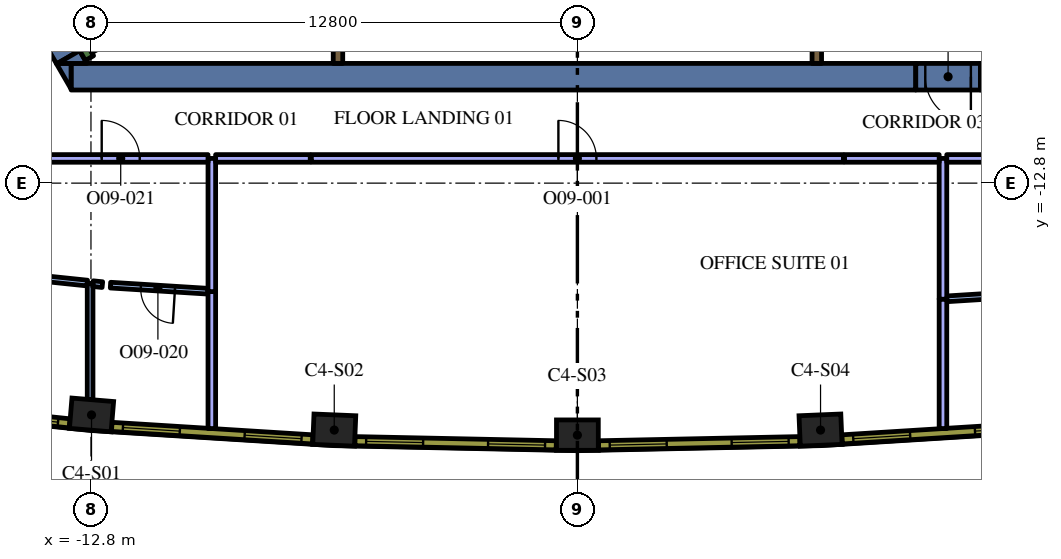
"""IFC4 building model, lengths in metres.
Left out: names, types, materials, properties, quantities, classifications, styles, units other than length and angle.
Written with IfcOpenShell. Run it as: python <this file> out.ifc"""

import sys

from ifc_helpers import new_model, si_unit, direction, frame, frame_2d, origin, origin_2d, place, context, subcontext, project, spatial, polyline, rectangle, outline, extrude, element, fill, save


model = new_model("IFC4")
c1 = context("Model", 3, precision=1e-05, world=origin(), true_north=direction((0.0, 1.0)))
c2 = subcontext(c1, "Body", "Model", "MODEL_VIEW")
j1 = project(units=[si_unit("LENGTHUNIT", "METRE"), si_unit("PLANEANGLEUNIT", "RADIAN")], contexts=[c1])
p1 = place(None, origin())
s1 = spatial("IfcSite", under=j1, at=p1, CompositionType="ELEMENT")
p2 = place(p1, origin())
s2 = spatial("IfcBuilding", under=s1, at=p2, CompositionType="ELEMENT")
p3 = place(p2, frame((0.0, 0.0, 243.6)))
s3 = spatial("IfcBuildingStorey", under=s2, at=p3, CompositionType="ELEMENT", Elevation=243.6)
for number, where, z_axis, x_axis in (
    (1, (-12.785, -18.9, 0.0), (0.0, 0.0, 1.0), (0.997, -0.083, 0.0)),
    (2, (-6.398, -19.298, 0.0), (0.0, 0.0, 1.0), (0.999, -0.041, 0.0)),
    (3, (0.0, -19.431, 0.0), (0.0, 0.0, 1.0), (1.0, 0.0, 0.0)),
    (4, (6.398, -19.298, 0.0), (0.0, 0.0, 1.0), (0.999, 0.041, 0.0)),
):
    element("IfcColumn", number, at=place(p3, frame(where, z_axis=z_axis, x_axis=x_axis)), inside=s3, PredefinedType="COLUMN", context=c2, shape_type="SweptSolid", body=[
        extrude(rectangle(XDim=1.1, YDim=0.8, at=origin_2d()), origin(), (0.0, 0.0, 1.0), 4.2),
    ])
p4 = place(p3, frame((10.604, -10.0, 0.0), z_axis=(0.0, 0.0, 1.0), x_axis=(1.0, 0.0, 0.0)))
e5 = element("IfcWall", 5, at=p4, inside=s3, PredefinedType="SOLIDWALL", context=c2, shape_type="SweptSolid", body=[
    extrude(rectangle(XDim=1.909, YDim=0.7, at=frame_2d((0.955, 0.0))), origin(), (0.0, 0.0, 1.0), 4.2),
])
p5 = place(p3, frame((8.904, -10.0, 0.0), z_axis=(0.0, 0.0, 1.0), x_axis=(-1.0, 0.0, 0.0)))
e6 = element("IfcWall", 6, at=p5, inside=s3, PredefinedType="SOLIDWALL", context=c2, shape_type="SweptSolid", body=[
    extrude(rectangle(XDim=22.226, YDim=0.7, at=frame_2d((11.113, 0.0))), origin(), (0.0, 0.0, 1.0), 4.2),
])
p6 = place(p3, origin())
e7 = element("IfcWall", 7, at=p6, inside=s3, PredefinedType="SOLIDWALL", context=c2, shape_type="SweptSolid", body=[
    extrude(outline(polyline([(-13.712, -9.65), (-13.324, -9.65), (-13.324, -10.322), (-13.712, -9.65)])), origin(), (0.0, 0.0, 1.0), 4.2),
])
p7 = place(p3, frame((-13.402, -9.487, 0.0), z_axis=(0.0, 0.0, 1.0), x_axis=(-0.500020498207, 0.866013568815, 0.0)))
e8 = element("IfcWall", 8, at=p7, inside=s3, PredefinedType="SOLIDWALL", context=c2, shape_type="SweptSolid", body=[
    extrude(rectangle(XDim=3.829, YDim=0.7, at=frame_2d((1.915, 0.0))), origin(), (0.0, 0.0, 1.0), 4.2),
])
e9 = element("IfcWall", 9, at=p6, inside=s3, PredefinedType="SOLIDWALL", context=c2, shape_type="SweptSolid", body=[
    extrude(outline(polyline([(-12.904, -9.65), (-13.68, -9.65), (-13.098, -9.314), (-12.904, -9.65)])), origin(), (0.0, 0.0, 1.0), 4.2),
])
p8 = place(p3, frame((12.84, -9.261, 0.0), z_axis=(0.0, 0.0, 1.0), x_axis=(-0.866013990052, 0.500019768644, 0.0)))
e10 = element("IfcWall", 10, at=p8, inside=s3, PredefinedType="SOLIDWALL", context=c2, shape_type="SweptSolid", body=[
    extrude(rectangle(XDim=6.8, YDim=0.25, at=frame_2d((3.4, 0.0))), origin(), (0.0, 0.0, 1.0), 4.2),
])
p9 = place(p3, frame((-12.84, -9.511, 0.0), z_axis=(0.0, 0.0, 1.0), x_axis=(-0.499997733992, 0.866026712061, 0.0)))
e11 = element("IfcWall", 11, at=p9, inside=s3, PredefinedType="SOLIDWALL", context=c2, shape_type="SweptSolid", body=[
    extrude(rectangle(XDim=3.634, YDim=0.25, at=frame_2d((1.817, 0.0))), origin(), (0.0, 0.0, 1.0), 4.2),
])
p10 = place(p3, frame((-12.84, -9.261, 0.0), z_axis=(0.0, 0.0, 1.0), x_axis=(0.866016039709, 0.500016218704, 0.0)))
e12 = element("IfcWall", 12, at=p10, inside=s3, PredefinedType="SOLIDWALL", context=c2, shape_type="SweptSolid", body=[
    extrude(rectangle(XDim=7.05, YDim=0.25, at=frame_2d((3.525, 0.0))), origin(), (0.0, 0.0, 1.0), 4.2),
])
p11 = place(p3, frame((-6.3, -8.925, 0.0), z_axis=(0.0, 0.0, 1.0), x_axis=(0.0, -1.0, 0.0)))
e13 = element("IfcWall", 13, at=p11, inside=s3, PredefinedType="SOLIDWALL", context=c2, shape_type="SweptSolid", body=[
    extrude(rectangle(XDim=0.725, YDim=0.25, at=frame_2d((0.363, 0.0))), origin(), (0.0, 0.0, 1.0), 4.2),
])
p12 = place(p3, frame((6.3, -9.65, 0.0), z_axis=(0.0, 0.0, 1.0), x_axis=(0.0, 1.0, 0.0)))
e14 = element("IfcWall", 14, at=p12, inside=s3, PredefinedType="SOLIDWALL", context=c2, shape_type="SweptSolid", body=[
    extrude(rectangle(XDim=1.008, YDim=0.25, at=frame_2d((0.504, 0.0))), origin(), (0.0, 0.0, 1.0), 4.2),
])
p13 = place(p3, frame((10.604, -10.0, 0.0), z_axis=(0.0, 0.0, 1.0), x_axis=(-1.0, 0.0, 0.0)))
e15 = element("IfcWall", 15, at=p13, inside=s3, PredefinedType="SOLIDWALL", context=c2, shape_type="SweptSolid", body=[
    extrude(rectangle(XDim=1.7, YDim=0.7, at=frame_2d((0.85, 0.0))), origin(), (0.0, 0.0, 1.0), 4.2),
])
p14 = place(p13, frame((0.25, 0.0, 0.0)))
e16 = element("IfcOpeningElement", 16, at=p14, cuts=e15, PredefinedType="OPENING", context=c2, shape_type="SweptSolid", body=[
    extrude(rectangle(XDim=1.2, YDim=2.1, at=frame_2d((0.6, 1.05))), frame((0.0, 0.36, 0.0), z_axis=(0.0, -1.0, 0.0), x_axis=(1.0, 0.0, 0.0)), (0.0, 0.0, 1.0), 0.72),
])
p15 = place(p3, frame((9.62, -15.847, 0.0), z_axis=(0.0, 0.0, 1.0), x_axis=(0.0, -1.0, 0.0)))
e17 = element("IfcWall", 17, at=p15, inside=s3, PredefinedType="PARTITIONING", context=c2, shape_type="SweptSolid", body=[
    extrude(rectangle(XDim=3.411, YDim=0.2, at=frame_2d((1.705, 0.0))), origin(), (0.0, 0.0, 1.0), 3.45),
])
p16 = place(p3, frame((9.62, -12.15, 0.0), z_axis=(0.0, 0.0, 1.0), x_axis=(0.0, -1.0, 0.0)))
e18 = element("IfcWall", 18, at=p16, inside=s3, PredefinedType="PARTITIONING", context=c2, shape_type="SweptSolid", body=[
    extrude(rectangle(XDim=3.705, YDim=0.2, at=frame_2d((1.853, 0.0))), origin(), (0.0, 0.0, 1.0), 3.45),
])
p17 = place(p3, frame((-9.62, -19.257, 0.0), z_axis=(0.0, 0.0, 1.0), x_axis=(0.0, 1.0, 0.0)))
e19 = element("IfcWall", 19, at=p17, inside=s3, PredefinedType="PARTITIONING", context=c2, shape_type="SweptSolid", body=[
    extrude(rectangle(XDim=3.611, YDim=0.2, at=frame_2d((1.806, 0.0))), origin(), (0.0, 0.0, 1.0), 3.45),
])
p18 = place(p3, frame((-9.62, -15.654, 0.0), z_axis=(0.0, 0.0, 1.0), x_axis=(0.0, 1.0, 0.0)))
e20 = element("IfcWall", 20, at=p18, inside=s3, PredefinedType="PARTITIONING", context=c2, shape_type="SweptSolid", body=[
    extrude(rectangle(XDim=3.504, YDim=0.2, at=frame_2d((1.752, 0.0))), origin(), (0.0, 0.0, 1.0), 3.45),
])
p19 = place(p3, frame((-7.0, -12.15, 0.0), z_axis=(0.0, 0.0, 1.0), x_axis=(1.0, 0.0, 0.0)))
e21 = element("IfcWall", 21, at=p19, inside=s3, PredefinedType="PARTITIONING", context=c2, shape_type="SweptSolid", body=[
    extrude(rectangle(XDim=14.0, YDim=0.2, at=frame_2d((7.0, 0.0))), origin(), (0.0, 0.0, 1.0), 3.45),
])
p20 = place(p19, frame((6.5, 0.0, 0.0)))
e22 = element("IfcOpeningElement", 22, at=p20, cuts=e21, PredefinedType="OPENING", context=c2, shape_type="SweptSolid", body=[
    extrude(rectangle(XDim=1.0, YDim=2.1, at=frame_2d((0.5, 1.05))), frame((0.0, 0.11, 0.0), z_axis=(0.0, -1.0, 0.0), x_axis=(1.0, 0.0, 0.0)), (0.0, 0.0, 1.0), 0.22),
])
for number, where, z_axis, x_axis in (
    (23, (-9.52, -12.15, 0.0), (0.0, 0.0, 1.0), (1.0, 0.0, 0.0)),
    (24, (7.03, -12.15, 0.0), (0.0, 0.0, 1.0), (1.0, 0.0, 0.0)),
):
    element("IfcWall", number, at=place(p3, frame(where, z_axis=z_axis, x_axis=x_axis)), inside=s3, PredefinedType="PARTITIONING", context=c2, shape_type="SweptSolid", body=[
        extrude(rectangle(XDim=2.49, YDim=0.2, at=frame_2d((1.245, 0.0))), origin(), (0.0, 0.0, 1.0), 3.45),
    ])
p21 = place(p3, frame((9.72, -15.844, 0.0), z_axis=(0.0, 0.0, 1.0), x_axis=(0.998063411199, 0.062204720286, 0.0)))
e25 = element("IfcWall", 25, at=p21, inside=s3, PredefinedType="PARTITIONING", context=c2, shape_type="SweptSolid", body=[
    extrude(rectangle(XDim=2.802, YDim=0.15, at=frame_2d((1.401, 0.0))), origin(), (0.0, 0.0, 1.0), 3.45),
])
p22 = place(p3, frame((9.72, -12.15, 0.0), z_axis=(0.0, 0.0, 1.0), x_axis=(1.0, 0.0, 0.0)))
e26 = element("IfcWall", 26, at=p22, inside=s3, PredefinedType="PARTITIONING", context=c2, shape_type="SweptSolid", body=[
    extrude(rectangle(XDim=4.627, YDim=0.2, at=frame_2d((2.314, 0.0))), origin(), (0.0, 0.0, 1.0), 3.45),
])
p23 = place(p22, frame((1.8, 0.0, 0.0)))
e27 = element("IfcOpeningElement", 27, at=p23, cuts=e26, PredefinedType="OPENING", context=c2, shape_type="SweptSolid", body=[
    extrude(rectangle(XDim=1.0, YDim=2.1, at=frame_2d((0.5, 1.05))), frame((0.0, 0.11, 0.0), z_axis=(0.0, -1.0, 0.0), x_axis=(1.0, 0.0, 0.0)), (0.0, 0.0, 1.0), 0.22),
])
p24 = place(p3, frame((-12.823, -15.437, 0.0), z_axis=(0.0, 0.0, 1.0), x_axis=(0.0, -1.0, 0.0)))
e28 = element("IfcWall", 28, at=p24, inside=s3, PredefinedType="PARTITIONING", context=c2, shape_type="SweptSolid", body=[
    extrude(rectangle(XDim=3.058, YDim=0.15, at=frame_2d((1.529, 0.0))), origin(), (0.0, 0.0, 1.0), 3.45),
])
p25 = place(p3, frame((-12.898, -15.429, 0.0), z_axis=(0.0, 0.0, 1.0), x_axis=(-0.99462039429, 0.103587022653, 0.0)))
e29 = element("IfcWall", 29, at=p25, inside=s3, PredefinedType="PARTITIONING", context=c2, shape_type="SweptSolid", body=[
    extrude(rectangle(XDim=5.279, YDim=0.15, at=frame_2d((2.64, 0.0))), origin(), (0.0, 0.0, 1.0), 3.45),
])
p26 = place(p25, frame((2.179, 0.0, 0.0)))
e30 = element("IfcOpeningElement", 30, at=p26, cuts=e29, PredefinedType="OPENING", context=c2, shape_type="SweptSolid", body=[
    extrude(rectangle(XDim=0.9, YDim=2.1, at=frame_2d((0.45, 1.05))), frame((0.0, 0.085, 0.0), z_axis=(0.0, -1.0, 0.0), x_axis=(1.0, 0.0, 0.0)), (0.0, 0.0, 1.0), 0.17),
])
p27 = place(p3, frame((-12.748, -15.445, 0.0), z_axis=(0.0, 0.0, 1.0), x_axis=(0.99468140225, -0.102999553487, 0.0)))
e31 = element("IfcWall", 31, at=p27, inside=s3, PredefinedType="PARTITIONING", context=c2, shape_type="SweptSolid", body=[
    extrude(rectangle(XDim=0.249, YDim=0.15, at=frame_2d((0.125, 0.0))), origin(), (0.0, 0.0, 1.0), 3.45),
])
p28 = place(p3, frame((-9.72, -15.644, 0.0), z_axis=(0.0, 0.0, 1.0), x_axis=(-0.998064382534, 0.062189133425, 0.0)))
e32 = element("IfcWall", 32, at=p28, inside=s3, PredefinedType="PARTITIONING", context=c2, shape_type="SweptSolid", body=[
    extrude(rectangle(XDim=2.571, YDim=0.15, at=frame_2d((1.286, 0.0))), origin(), (0.0, 0.0, 1.0), 3.45),
])
p29 = place(p28, frame((0.871, 0.0, 0.0)))
e33 = element("IfcOpeningElement", 33, at=p29, cuts=e32, PredefinedType="OPENING", context=c2, shape_type="SweptSolid", body=[
    extrude(rectangle(XDim=0.9, YDim=2.1, at=frame_2d((0.45, 1.05))), frame((0.0, 0.085, 0.0), z_axis=(0.0, -1.0, 0.0), x_axis=(1.0, 0.0, 0.0)), (0.0, 0.0, 1.0), 0.17),
])
p30 = place(p3, frame((-14.317, -12.15, 0.0), z_axis=(0.0, 0.0, 1.0), x_axis=(1.0, 0.0, 0.0)))
e34 = element("IfcWall", 34, at=p30, inside=s3, PredefinedType="PARTITIONING", context=c2, shape_type="SweptSolid", body=[
    extrude(rectangle(XDim=4.597, YDim=0.2, at=frame_2d((2.299, 0.0))), origin(), (0.0, 0.0, 1.0), 3.45),
])
p31 = place(p30, frame((1.8, 0.0, 0.0)))
e35 = element("IfcOpeningElement", 35, at=p31, cuts=e34, PredefinedType="OPENING", context=c2, shape_type="SweptSolid", body=[
    extrude(rectangle(XDim=1.0, YDim=2.1, at=frame_2d((0.5, 1.05))), frame((0.0, 0.11, 0.0), z_axis=(0.0, -1.0, 0.0), x_axis=(1.0, 0.0, 0.0)), (0.0, 0.0, 1.0), 0.22),
])
p32 = place(p3, frame((-18.644, -18.571, 0.0), z_axis=(0.0, 0.0, 1.0), x_axis=(0.994621961215, -0.103571976272, 0.0)))
e36 = element("IfcWall", 36, at=p32, inside=s3, PredefinedType="SOLIDWALL", context=c2, shape_type="SweptSolid", body=[
    extrude(rectangle(XDim=5.311, YDim=0.24, at=frame_2d((2.655, 0.0))), origin(), (0.0, 0.0, 1.0), 3.95),
])
p33 = place(p32, frame((0.271, 0.0, 0.9)))
e37 = element("IfcOpeningElement", 37, at=p33, cuts=e36, PredefinedType="OPENING", context=c2, shape_type="SweptSolid", body=[
    extrude(rectangle(XDim=1.5, YDim=2.55, at=frame_2d((0.75, 1.275))), frame((0.0, 0.13, 0.0), z_axis=(0.0, -1.0, 0.0), x_axis=(1.0, 0.0, 0.0)), (0.0, 0.0, 1.0), 0.26),
])
p34 = place(p32, frame((3.504, 0.0, 0.9)))
e38 = element("IfcOpeningElement", 38, at=p34, cuts=e36, PredefinedType="OPENING", context=c2, shape_type="SweptSolid", body=[
    extrude(rectangle(XDim=1.5, YDim=2.55, at=frame_2d((0.75, 1.275))), frame((0.0, 0.13, 0.0), z_axis=(0.0, -1.0, 0.0), x_axis=(1.0, 0.0, 0.0)), (0.0, 0.0, 1.0), 0.26),
])
p35 = place(p3, frame((-12.253, -19.213, 0.0), z_axis=(0.0, 0.0, 1.0), x_axis=(0.9980633213, -0.062206162685, 0.0)))
e39 = element("IfcWall", 39, at=p35, inside=s3, PredefinedType="SOLIDWALL", context=c2, shape_type="SweptSolid", body=[
    extrude(rectangle(XDim=5.298, YDim=0.24, at=frame_2d((2.649, 0.0))), origin(), (0.0, 0.0, 1.0), 3.95),
])
p36 = place(p35, frame((0.294, 0.0, 0.9)))
e40 = element("IfcOpeningElement", 40, at=p36, cuts=e39, PredefinedType="OPENING", context=c2, shape_type="SweptSolid", body=[
    extrude(rectangle(XDim=1.5, YDim=2.55, at=frame_2d((0.75, 1.275))), frame((0.0, 0.13, 0.0), z_axis=(0.0, -1.0, 0.0), x_axis=(1.0, 0.0, 0.0)), (0.0, 0.0, 1.0), 0.26),
])
p37 = place(p35, frame((3.504, 0.0, 0.9)))
e41 = element("IfcOpeningElement", 41, at=p37, cuts=e39, PredefinedType="OPENING", context=c2, shape_type="SweptSolid", body=[
    extrude(rectangle(XDim=1.5, YDim=2.55, at=frame_2d((0.75, 1.275))), frame((0.0, 0.13, 0.0), z_axis=(0.0, -1.0, 0.0), x_axis=(1.0, 0.0, 0.0)), (0.0, 0.0, 1.0), 0.26),
])
p38 = place(p3, frame((-5.854, -19.589, 0.0), z_axis=(0.0, 0.0, 1.0), x_axis=(0.999784035184, -0.020781794712, 0.0)))
e42 = element("IfcWall", 42, at=p38, inside=s3, PredefinedType="SOLIDWALL", context=c2, shape_type="SweptSolid", body=[
    extrude(rectangle(XDim=5.298, YDim=0.24, at=frame_2d((2.649, 0.0))), origin(), (0.0, 0.0, 1.0), 3.95),
])
p39 = place(p38, frame((0.294, 0.0, 0.9)))
e43 = element("IfcOpeningElement", 43, at=p39, cuts=e42, PredefinedType="OPENING", context=c2, shape_type="SweptSolid", body=[
    extrude(rectangle(XDim=1.5, YDim=2.55, at=frame_2d((0.75, 1.275))), frame((0.0, 0.13, 0.0), z_axis=(0.0, -1.0, 0.0), x_axis=(1.0, 0.0, 0.0)), (0.0, 0.0, 1.0), 0.26),
])
p40 = place(p38, frame((3.504, 0.0, 0.9)))
e44 = element("IfcOpeningElement", 44, at=p40, cuts=e42, PredefinedType="OPENING", context=c2, shape_type="SweptSolid", body=[
    extrude(rectangle(XDim=1.5, YDim=2.55, at=frame_2d((0.75, 1.275))), frame((0.0, 0.13, 0.0), z_axis=(0.0, -1.0, 0.0), x_axis=(1.0, 0.0, 0.0)), (0.0, 0.0, 1.0), 0.26),
])
p41 = place(p3, frame((0.556, -19.699, 0.0), z_axis=(0.0, 0.0, 1.0), x_axis=(0.999784035184, 0.020781794712, 0.0)))
e45 = element("IfcWall", 45, at=p41, inside=s3, PredefinedType="SOLIDWALL", context=c2, shape_type="SweptSolid", body=[
    extrude(rectangle(XDim=5.298, YDim=0.24, at=frame_2d((2.649, 0.0))), origin(), (0.0, 0.0, 1.0), 3.95),
])
p42 = place(p41, frame((0.294, 0.0, 0.9)))
e46 = element("IfcOpeningElement", 46, at=p42, cuts=e45, PredefinedType="OPENING", context=c2, shape_type="SweptSolid", body=[
    extrude(rectangle(XDim=1.5, YDim=2.55, at=frame_2d((0.75, 1.275))), frame((0.0, 0.13, 0.0), z_axis=(0.0, -1.0, 0.0), x_axis=(1.0, 0.0, 0.0)), (0.0, 0.0, 1.0), 0.26),
])
p43 = place(p41, frame((3.504, 0.0, 0.9)))
e47 = element("IfcOpeningElement", 47, at=p43, cuts=e45, PredefinedType="OPENING", context=c2, shape_type="SweptSolid", body=[
    extrude(rectangle(XDim=1.5, YDim=2.55, at=frame_2d((0.75, 1.275))), frame((0.0, 0.13, 0.0), z_axis=(0.0, -1.0, 0.0), x_axis=(1.0, 0.0, 0.0)), (0.0, 0.0, 1.0), 0.26),
])
p44 = place(p3, frame((6.965, -19.543, 0.0), z_axis=(0.0, 0.0, 1.0), x_axis=(0.9980633213, 0.062206162685, 0.0)))
e48 = element("IfcWall", 48, at=p44, inside=s3, PredefinedType="SOLIDWALL", context=c2, shape_type="SweptSolid", body=[
    extrude(rectangle(XDim=5.298, YDim=0.24, at=frame_2d((2.649, 0.0))), origin(), (0.0, 0.0, 1.0), 3.95),
])
p45 = place(p44, frame((0.295, 0.0, 0.9)))
e49 = element("IfcOpeningElement", 49, at=p45, cuts=e48, PredefinedType="OPENING", context=c2, shape_type="SweptSolid", body=[
    extrude(rectangle(XDim=1.5, YDim=2.55, at=frame_2d((0.75, 1.275))), frame((0.0, 0.13, 0.0), z_axis=(0.0, -1.0, 0.0), x_axis=(1.0, 0.0, 0.0)), (0.0, 0.0, 1.0), 0.26),
])
p46 = place(p44, frame((3.504, 0.0, 0.9)))
e50 = element("IfcOpeningElement", 50, at=p46, cuts=e48, PredefinedType="OPENING", context=c2, shape_type="SweptSolid", body=[
    extrude(rectangle(XDim=1.5, YDim=2.55, at=frame_2d((0.75, 1.275))), frame((0.0, 0.13, 0.0), z_axis=(0.0, -1.0, 0.0), x_axis=(1.0, 0.0, 0.0)), (0.0, 0.0, 1.0), 0.26),
])
p47 = place(p14, origin())
e51 = element("IfcDoor", 51, at=p47, inside=s3, OperationType="SINGLE_SWING_LEFT", PredefinedType="DOOR", context=c2, shape_type="SweptSolid", body=[
    extrude(rectangle(XDim=1.2, YDim=2.1, at=frame_2d((0.6, 1.05))), frame((0.0, 0.025, 0.0), z_axis=(0.0, -1.0, 0.0), x_axis=(1.0, 0.0, 0.0)), (0.0, 0.0, 1.0), 0.05),
])
fill(e16, e51)
p48 = place(p20, origin())
e52 = element("IfcDoor", 52, at=p48, inside=s3, OperationType="SINGLE_SWING_RIGHT", PredefinedType="DOOR", context=c2, shape_type="SweptSolid", body=[
    extrude(rectangle(XDim=1.0, YDim=2.1, at=frame_2d((0.5, 1.05))), frame((0.0, 0.025, 0.0), z_axis=(0.0, -1.0, 0.0), x_axis=(1.0, 0.0, 0.0)), (0.0, 0.0, 1.0), 0.05),
])
fill(e22, e52)
p49 = place(p29, origin())
e53 = element("IfcDoor", 53, at=p49, inside=s3, OperationType="SINGLE_SWING_RIGHT", PredefinedType="DOOR", context=c2, shape_type="SweptSolid", body=[
    extrude(rectangle(XDim=0.9, YDim=2.1, at=frame_2d((0.45, 1.05))), frame((0.0, 0.025, 0.0), z_axis=(0.0, -1.0, 0.0), x_axis=(1.0, 0.0, 0.0)), (0.0, 0.0, 1.0), 0.05),
])
fill(e33, e53)
p50 = place(p31, origin())
e54 = element("IfcDoor", 54, at=p50, inside=s3, OperationType="SINGLE_SWING_RIGHT", PredefinedType="DOOR", context=c2, shape_type="SweptSolid", body=[
    extrude(rectangle(XDim=1.0, YDim=2.1, at=frame_2d((0.5, 1.05))), frame((0.0, 0.025, 0.0), z_axis=(0.0, -1.0, 0.0), x_axis=(1.0, 0.0, 0.0)), (0.0, 0.0, 1.0), 0.05),
])
fill(e35, e54)
p51 = place(p34, origin())
e55 = element("IfcWindow", 55, at=p51, inside=s3, PartitioningType="SINGLE_PANEL", PredefinedType="WINDOW", context=c2, shape_type="SweptSolid", body=[
    extrude(rectangle(XDim=1.5, YDim=2.55, at=frame_2d((0.75, 1.275))), frame((0.0, 0.04, 0.0), z_axis=(0.0, -1.0, 0.0), x_axis=(1.0, 0.0, 0.0)), (0.0, 0.0, 1.0), 0.06),
])
fill(e38, e55)
p52 = place(p36, origin())
e56 = element("IfcWindow", 56, at=p52, inside=s3, PartitioningType="SINGLE_PANEL", PredefinedType="WINDOW", context=c2, shape_type="SweptSolid", body=[
    extrude(rectangle(XDim=1.5, YDim=2.55, at=frame_2d((0.75, 1.275))), frame((0.0, 0.04, 0.0), z_axis=(0.0, -1.0, 0.0), x_axis=(1.0, 0.0, 0.0)), (0.0, 0.0, 1.0), 0.06),
])
fill(e40, e56)
p53 = place(p37, origin())
e57 = element("IfcWindow", 57, at=p53, inside=s3, PartitioningType="SINGLE_PANEL", PredefinedType="WINDOW", context=c2, shape_type="SweptSolid", body=[
    extrude(rectangle(XDim=1.5, YDim=2.55, at=frame_2d((0.75, 1.275))), frame((0.0, 0.04, 0.0), z_axis=(0.0, -1.0, 0.0), x_axis=(1.0, 0.0, 0.0)), (0.0, 0.0, 1.0), 0.06),
])
fill(e41, e57)
p54 = place(p39, origin())
e58 = element("IfcWindow", 58, at=p54, inside=s3, PartitioningType="SINGLE_PANEL", PredefinedType="WINDOW", context=c2, shape_type="SweptSolid", body=[
    extrude(rectangle(XDim=1.5, YDim=2.55, at=frame_2d((0.75, 1.275))), frame((0.0, 0.04, 0.0), z_axis=(0.0, -1.0, 0.0), x_axis=(1.0, 0.0, 0.0)), (0.0, 0.0, 1.0), 0.06),
])
fill(e43, e58)
p55 = place(p40, origin())
e59 = element("IfcWindow", 59, at=p55, inside=s3, PartitioningType="SINGLE_PANEL", PredefinedType="WINDOW", context=c2, shape_type="SweptSolid", body=[
    extrude(rectangle(XDim=1.5, YDim=2.55, at=frame_2d((0.75, 1.275))), frame((0.0, 0.04, 0.0), z_axis=(0.0, -1.0, 0.0), x_axis=(1.0, 0.0, 0.0)), (0.0, 0.0, 1.0), 0.06),
])
fill(e44, e59)
p56 = place(p42, origin())
e60 = element("IfcWindow", 60, at=p56, inside=s3, PartitioningType="SINGLE_PANEL", PredefinedType="WINDOW", context=c2, shape_type="SweptSolid", body=[
    extrude(rectangle(XDim=1.5, YDim=2.55, at=frame_2d((0.75, 1.275))), frame((0.0, 0.04, 0.0), z_axis=(0.0, -1.0, 0.0), x_axis=(1.0, 0.0, 0.0)), (0.0, 0.0, 1.0), 0.06),
])
fill(e46, e60)
p57 = place(p43, origin())
e61 = element("IfcWindow", 61, at=p57, inside=s3, PartitioningType="SINGLE_PANEL", PredefinedType="WINDOW", context=c2, shape_type="SweptSolid", body=[
    extrude(rectangle(XDim=1.5, YDim=2.55, at=frame_2d((0.75, 1.275))), frame((0.0, 0.04, 0.0), z_axis=(0.0, -1.0, 0.0), x_axis=(1.0, 0.0, 0.0)), (0.0, 0.0, 1.0), 0.06),
])
fill(e47, e61)
p58 = place(p45, origin())
e62 = element("IfcWindow", 62, at=p58, inside=s3, PartitioningType="SINGLE_PANEL", PredefinedType="WINDOW", context=c2, shape_type="SweptSolid", body=[
    extrude(rectangle(XDim=1.5, YDim=2.55, at=frame_2d((0.75, 1.275))), frame((0.0, 0.04, 0.0), z_axis=(0.0, -1.0, 0.0), x_axis=(1.0, 0.0, 0.0)), (0.0, 0.0, 1.0), 0.06),
])
fill(e49, e62)
p59 = place(p46, origin())
e63 = element("IfcWindow", 63, at=p59, inside=s3, PartitioningType="SINGLE_PANEL", PredefinedType="WINDOW", context=c2, shape_type="SweptSolid", body=[
    extrude(rectangle(XDim=1.5, YDim=2.55, at=frame_2d((0.75, 1.275))), frame((0.0, 0.04, 0.0), z_axis=(0.0, -1.0, 0.0), x_axis=(1.0, 0.0, 0.0)), (0.0, 0.0, 1.0), 0.06),
])
fill(e50, e63)
save(model, sys.argv[1])
